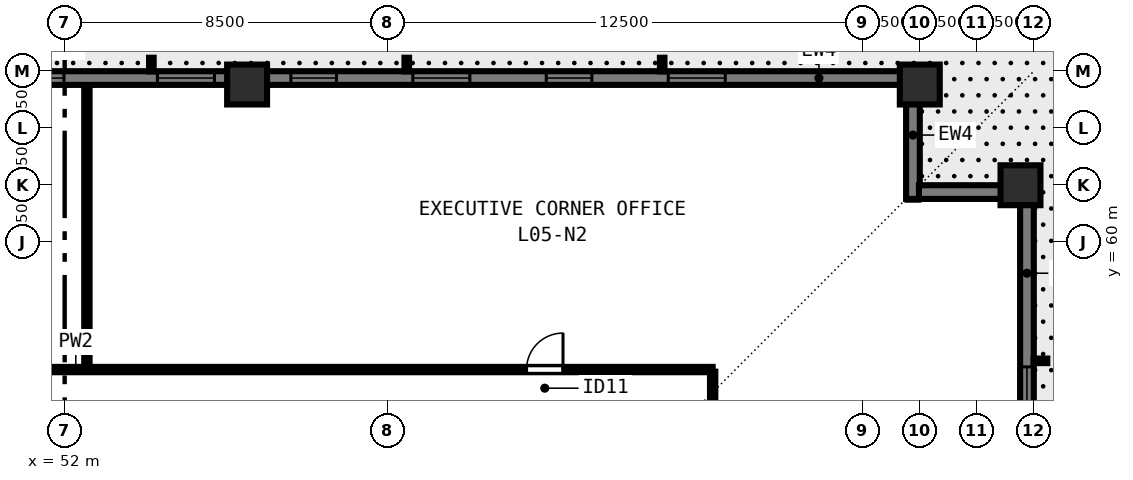
"""IFC4 building model, lengths in metres.
Left out: names, types, materials, properties, quantities, classifications, styles, units other than length and angle.
Written with IfcOpenShell. Run it as: python <this file> out.ifc"""

import sys

from ifc_helpers import new_model, si_unit, direction, frame, frame_2d, origin, origin_2d, place, context, subcontext, project, spatial, rectangle, extrude, element, fill, save


model = new_model("IFC4")
c1 = context("Model", 3, precision=1e-05, world=origin(), true_north=direction((0.0, 1.0)))
c2 = subcontext(c1, "Body", "Model", "MODEL_VIEW")
j1 = project(units=[si_unit("LENGTHUNIT", "METRE"), si_unit("PLANEANGLEUNIT", "RADIAN")], contexts=[c1])
p1 = place(None, origin())
s1 = spatial("IfcSite", under=j1, at=p1, CompositionType="ELEMENT")
p2 = place(p1, origin())
s2 = spatial("IfcBuilding", under=s1, at=p2, CompositionType="ELEMENT")
p3 = place(p2, frame((0.0, 0.0, 23.5)))
s3 = spatial("IfcBuildingStorey", under=s2, at=p3, CompositionType="ELEMENT", Elevation=23.5)
for number, where, z_axis, x_axis in (
    (1, (77.15, 61.5, 0.0), (0.0, 0.0, 1.0), (0.0, 1.0, 0.0)),
    (2, (74.5, 64.15, 0.0), (0.0, 0.0, 1.0), (1.0, 0.0, 0.0)),
    (3, (56.8, 64.15, 0.0), (0.0, 0.0, 1.0), (1.0, 0.0, 0.0)),
):
    element("IfcColumn", number, at=place(p3, frame(where, z_axis=z_axis, x_axis=x_axis)), inside=s3, PredefinedType="COLUMN", context=c2, shape_type="SweptSolid", body=[
        extrude(rectangle(XDim=1.05, YDim=1.05, at=origin_2d()), origin(), (0.0, 0.0, 1.0), 3.5),
    ])
p4 = place(p3, frame((29.5, 64.32, 0.0), z_axis=(0.0, 0.0, 1.0), x_axis=(1.0, 0.0, 0.0)))
e4 = element("IfcWall", 4, at=p4, inside=s3, PredefinedType="SOLIDWALL", context=c2, shape_type="SweptSolid", body=[
    extrude(rectangle(XDim=44.662, YDim=0.36, at=frame_2d((22.331, 0.0))), origin(), (0.0, 0.0, 1.0), 3.28),
])
p5 = place(p4, frame((4.78, 0.0, 0.8)))
e5 = element("IfcOpeningElement", 5, at=p5, cuts=e4, PredefinedType="OPENING", context=c2, shape_type="SweptSolid", body=[
    extrude(rectangle(XDim=1.5, YDim=1.544, at=frame_2d((0.75, 0.772))), frame((0.0, 0.19, 0.0), z_axis=(0.0, -1.0, 0.0), x_axis=(1.0, 0.0, 0.0)), (0.0, 0.0, 1.0), 0.38),
])
p6 = place(p4, frame((8.29, 0.0, 0.8)))
e6 = element("IfcOpeningElement", 6, at=p6, cuts=e4, PredefinedType="OPENING", context=c2, shape_type="SweptSolid", body=[
    extrude(rectangle(XDim=1.2, YDim=1.544, at=frame_2d((0.6, 0.772))), frame((0.0, 0.19, 0.0), z_axis=(0.0, -1.0, 0.0), x_axis=(1.0, 0.0, 0.0)), (0.0, 0.0, 1.0), 0.38),
])
p7 = place(p4, frame((11.5, 0.0, 0.8)))
e7 = element("IfcOpeningElement", 7, at=p7, cuts=e4, PredefinedType="OPENING", context=c2, shape_type="SweptSolid", body=[
    extrude(rectangle(XDim=1.5, YDim=1.544, at=frame_2d((0.75, 0.772))), frame((0.0, 0.19, 0.0), z_axis=(0.0, -1.0, 0.0), x_axis=(1.0, 0.0, 0.0)), (0.0, 0.0, 1.0), 0.38),
])
p8 = place(p4, frame((15.01, 0.0, 0.8)))
e8 = element("IfcOpeningElement", 8, at=p8, cuts=e4, PredefinedType="OPENING", context=c2, shape_type="SweptSolid", body=[
    extrude(rectangle(XDim=1.2, YDim=1.544, at=frame_2d((0.6, 0.772))), frame((0.0, 0.19, 0.0), z_axis=(0.0, -1.0, 0.0), x_axis=(1.0, 0.0, 0.0)), (0.0, 0.0, 1.0), 0.38),
])
p9 = place(p4, frame((18.671, 0.0, 0.8)))
e9 = element("IfcOpeningElement", 9, at=p9, cuts=e4, PredefinedType="OPENING", context=c2, shape_type="SweptSolid", body=[
    extrude(rectangle(XDim=1.5, YDim=1.544, at=frame_2d((0.75, 0.772))), frame((0.0, 0.19, 0.0), z_axis=(0.0, -1.0, 0.0), x_axis=(1.0, 0.0, 0.0)), (0.0, 0.0, 1.0), 0.38),
])
p10 = place(p4, frame((21.281, 0.0, 0.8)))
e10 = element("IfcOpeningElement", 10, at=p10, cuts=e4, PredefinedType="OPENING", context=c2, shape_type="SweptSolid", body=[
    extrude(rectangle(XDim=1.2, YDim=1.544, at=frame_2d((0.6, 0.772))), frame((0.0, 0.19, 0.0), z_axis=(0.0, -1.0, 0.0), x_axis=(1.0, 0.0, 0.0)), (0.0, 0.0, 1.0), 0.38),
])
p11 = place(p4, frame((24.941, 0.0, 0.8)))
e11 = element("IfcOpeningElement", 11, at=p11, cuts=e4, PredefinedType="OPENING", context=c2, shape_type="SweptSolid", body=[
    extrude(rectangle(XDim=1.5, YDim=1.544, at=frame_2d((0.75, 0.772))), frame((0.0, 0.19, 0.0), z_axis=(0.0, -1.0, 0.0), x_axis=(1.0, 0.0, 0.0)), (0.0, 0.0, 1.0), 0.38),
])
p12 = place(p4, frame((28.451, 0.0, 0.8)))
e12 = element("IfcOpeningElement", 12, at=p12, cuts=e4, PredefinedType="OPENING", context=c2, shape_type="SweptSolid", body=[
    extrude(rectangle(XDim=1.2, YDim=1.544, at=frame_2d((0.6, 0.772))), frame((0.0, 0.19, 0.0), z_axis=(0.0, -1.0, 0.0), x_axis=(1.0, 0.0, 0.0)), (0.0, 0.0, 1.0), 0.38),
])
p13 = place(p4, frame((31.662, 0.0, 0.8)))
e13 = element("IfcOpeningElement", 13, at=p13, cuts=e4, PredefinedType="OPENING", context=c2, shape_type="SweptSolid", body=[
    extrude(rectangle(XDim=1.5, YDim=1.544, at=frame_2d((0.75, 0.772))), frame((0.0, 0.19, 0.0), z_axis=(0.0, -1.0, 0.0), x_axis=(1.0, 0.0, 0.0)), (0.0, 0.0, 1.0), 0.38),
])
p14 = place(p4, frame((35.172, 0.0, 0.8)))
e14 = element("IfcOpeningElement", 14, at=p14, cuts=e4, PredefinedType="OPENING", context=c2, shape_type="SweptSolid", body=[
    extrude(rectangle(XDim=1.2, YDim=1.544, at=frame_2d((0.6, 0.772))), frame((0.0, 0.19, 0.0), z_axis=(0.0, -1.0, 0.0), x_axis=(1.0, 0.0, 0.0)), (0.0, 0.0, 1.0), 0.38),
])
p15 = place(p4, frame((38.382, 0.0, 0.8)))
e15 = element("IfcOpeningElement", 15, at=p15, cuts=e4, PredefinedType="OPENING", context=c2, shape_type="SweptSolid", body=[
    extrude(rectangle(XDim=1.5, YDim=1.544, at=frame_2d((0.75, 0.772))), frame((0.0, 0.19, 0.0), z_axis=(0.0, -1.0, 0.0), x_axis=(1.0, 0.0, 0.0)), (0.0, 0.0, 1.0), 0.38),
])
p16 = place(p3, frame((74.32, 64.5, 0.0), z_axis=(0.0, 0.0, 1.0), x_axis=(0.0, -1.0, 0.0)))
e16 = element("IfcWall", 16, at=p16, inside=s3, PredefinedType="SOLIDWALL", context=c2, shape_type="SweptSolid", body=[
    extrude(rectangle(XDim=3.36, YDim=0.36, at=frame_2d((1.68, 0.0))), origin(), (0.0, 0.0, 1.0), 3.28),
])
p17 = place(p3, frame((74.478, 61.32, 0.0), z_axis=(0.0, 0.0, 1.0), x_axis=(1.0, 0.0, 0.0)))
e17 = element("IfcWall", 17, at=p17, inside=s3, PredefinedType="SOLIDWALL", context=c2, shape_type="SweptSolid", body=[
    extrude(rectangle(XDim=2.684, YDim=0.36, at=frame_2d((1.342, 0.0))), origin(), (0.0, 0.0, 1.0), 3.28),
])
p18 = place(p3, frame((77.32, 61.5, 0.0), z_axis=(0.0, 0.0, 1.0), x_axis=(0.0, -1.0, 0.0)))
e18 = element("IfcWall", 18, at=p18, inside=s3, PredefinedType="SOLIDWALL", context=c2, shape_type="SweptSolid", body=[
    extrude(rectangle(XDim=44.662, YDim=0.36, at=frame_2d((22.331, 0.0))), origin(), (0.0, 0.0, 1.0), 3.28),
])
p19 = place(p18, frame((4.78, 0.0, 0.8)))
e19 = element("IfcOpeningElement", 19, at=p19, cuts=e18, PredefinedType="OPENING", context=c2, shape_type="SweptSolid", body=[
    extrude(rectangle(XDim=1.5, YDim=1.544, at=frame_2d((0.75, 0.772))), frame((0.0, 0.19, 0.0), z_axis=(0.0, -1.0, 0.0), x_axis=(1.0, 0.0, 0.0)), (0.0, 0.0, 1.0), 0.38),
])
p20 = place(p18, frame((8.29, 0.0, 0.8)))
e20 = element("IfcOpeningElement", 20, at=p20, cuts=e18, PredefinedType="OPENING", context=c2, shape_type="SweptSolid", body=[
    extrude(rectangle(XDim=1.2, YDim=1.544, at=frame_2d((0.6, 0.772))), frame((0.0, 0.19, 0.0), z_axis=(0.0, -1.0, 0.0), x_axis=(1.0, 0.0, 0.0)), (0.0, 0.0, 1.0), 0.38),
])
p21 = place(p18, frame((11.5, 0.0, 0.8)))
e21 = element("IfcOpeningElement", 21, at=p21, cuts=e18, PredefinedType="OPENING", context=c2, shape_type="SweptSolid", body=[
    extrude(rectangle(XDim=1.5, YDim=1.544, at=frame_2d((0.75, 0.772))), frame((0.0, 0.19, 0.0), z_axis=(0.0, -1.0, 0.0), x_axis=(1.0, 0.0, 0.0)), (0.0, 0.0, 1.0), 0.38),
])
p22 = place(p18, frame((15.01, 0.0, 0.8)))
e22 = element("IfcOpeningElement", 22, at=p22, cuts=e18, PredefinedType="OPENING", context=c2, shape_type="SweptSolid", body=[
    extrude(rectangle(XDim=1.2, YDim=1.544, at=frame_2d((0.6, 0.772))), frame((0.0, 0.19, 0.0), z_axis=(0.0, -1.0, 0.0), x_axis=(1.0, 0.0, 0.0)), (0.0, 0.0, 1.0), 0.38),
])
p23 = place(p18, frame((18.671, 0.0, 0.8)))
e23 = element("IfcOpeningElement", 23, at=p23, cuts=e18, PredefinedType="OPENING", context=c2, shape_type="SweptSolid", body=[
    extrude(rectangle(XDim=1.5, YDim=1.544, at=frame_2d((0.75, 0.772))), frame((0.0, 0.19, 0.0), z_axis=(0.0, -1.0, 0.0), x_axis=(1.0, 0.0, 0.0)), (0.0, 0.0, 1.0), 0.38),
])
p24 = place(p18, frame((22.581, 0.0, 0.8)))
e24 = element("IfcOpeningElement", 24, at=p24, cuts=e18, PredefinedType="OPENING", context=c2, shape_type="SweptSolid", body=[
    extrude(rectangle(XDim=1.2, YDim=1.544, at=frame_2d((0.6, 0.772))), frame((0.0, 0.19, 0.0), z_axis=(0.0, -1.0, 0.0), x_axis=(1.0, 0.0, 0.0)), (0.0, 0.0, 1.0), 0.38),
])
p25 = place(p18, frame((24.941, 0.0, 0.8)))
e25 = element("IfcOpeningElement", 25, at=p25, cuts=e18, PredefinedType="OPENING", context=c2, shape_type="SweptSolid", body=[
    extrude(rectangle(XDim=1.5, YDim=1.544, at=frame_2d((0.75, 0.772))), frame((0.0, 0.19, 0.0), z_axis=(0.0, -1.0, 0.0), x_axis=(1.0, 0.0, 0.0)), (0.0, 0.0, 1.0), 0.38),
])
p26 = place(p18, frame((28.451, 0.0, 0.8)))
e26 = element("IfcOpeningElement", 26, at=p26, cuts=e18, PredefinedType="OPENING", context=c2, shape_type="SweptSolid", body=[
    extrude(rectangle(XDim=1.2, YDim=1.544, at=frame_2d((0.6, 0.772))), frame((0.0, 0.19, 0.0), z_axis=(0.0, -1.0, 0.0), x_axis=(1.0, 0.0, 0.0)), (0.0, 0.0, 1.0), 0.38),
])
p27 = place(p18, frame((31.662, 0.0, 0.8)))
e27 = element("IfcOpeningElement", 27, at=p27, cuts=e18, PredefinedType="OPENING", context=c2, shape_type="SweptSolid", body=[
    extrude(rectangle(XDim=1.5, YDim=1.544, at=frame_2d((0.75, 0.772))), frame((0.0, 0.19, 0.0), z_axis=(0.0, -1.0, 0.0), x_axis=(1.0, 0.0, 0.0)), (0.0, 0.0, 1.0), 0.38),
])
p28 = place(p18, frame((35.172, 0.0, 0.8)))
e28 = element("IfcOpeningElement", 28, at=p28, cuts=e18, PredefinedType="OPENING", context=c2, shape_type="SweptSolid", body=[
    extrude(rectangle(XDim=1.2, YDim=1.544, at=frame_2d((0.6, 0.772))), frame((0.0, 0.19, 0.0), z_axis=(0.0, -1.0, 0.0), x_axis=(1.0, 0.0, 0.0)), (0.0, 0.0, 1.0), 0.38),
])
p29 = place(p18, frame((38.382, 0.0, 0.8)))
e29 = element("IfcOpeningElement", 29, at=p29, cuts=e18, PredefinedType="OPENING", context=c2, shape_type="SweptSolid", body=[
    extrude(rectangle(XDim=1.5, YDim=1.544, at=frame_2d((0.75, 0.772))), frame((0.0, 0.19, 0.0), z_axis=(0.0, -1.0, 0.0), x_axis=(1.0, 0.0, 0.0)), (0.0, 0.0, 1.0), 0.38),
])
p30 = place(p3, frame((34.95, 56.65, 0.0), z_axis=(0.0, 0.0, 1.0), x_axis=(1.0, 0.0, 0.0)))
e30 = element("IfcWall", 30, at=p30, inside=s3, PredefinedType="PARTITIONING", context=c2, shape_type="SweptSolid", body=[
    extrude(rectangle(XDim=34.1, YDim=0.14, at=frame_2d((17.05, 0.0))), origin(), (0.0, 0.0, 1.0), 3.28),
])
p31 = place(p30, frame((4.522, 0.0, 0.0)))
e31 = element("IfcOpeningElement", 31, at=p31, cuts=e30, PredefinedType="OPENING", context=c2, shape_type="SweptSolid", body=[
    extrude(rectangle(XDim=0.96, YDim=2.12, at=frame_2d((0.48, 1.06))), frame((0.0, 0.08, 0.0), z_axis=(0.0, -1.0, 0.0), x_axis=(1.0, 0.0, 0.0)), (0.0, 0.0, 1.0), 0.16),
])
p32 = place(p30, frame((29.202, 0.0, 0.0)))
e32 = element("IfcOpeningElement", 32, at=p32, cuts=e30, PredefinedType="OPENING", context=c2, shape_type="SweptSolid", body=[
    extrude(rectangle(XDim=0.96, YDim=2.12, at=frame_2d((0.48, 1.06))), frame((0.0, 0.08, 0.0), z_axis=(0.0, -1.0, 0.0), x_axis=(1.0, 0.0, 0.0)), (0.0, 0.0, 1.0), 0.16),
])
p33 = place(p3, frame((69.05, 21.405, 0.0), z_axis=(0.0, 0.0, 1.0), x_axis=(0.0, 1.0, 0.0)))
e33 = element("IfcWall", 33, at=p33, inside=s3, PredefinedType="PARTITIONING", context=c2, shape_type="SweptSolid", body=[
    extrude(rectangle(XDim=35.19, YDim=0.14, at=frame_2d((17.595, 0.0))), origin(), (0.0, 0.0, 1.0), 3.28),
])
p34 = place(p33, frame((8.545, 0.0, 0.0)))
e34 = element("IfcOpeningElement", 34, at=p34, cuts=e33, PredefinedType="OPENING", context=c2, shape_type="SweptSolid", body=[
    extrude(rectangle(XDim=0.96, YDim=2.12, at=frame_2d((0.48, 1.06))), frame((0.0, 0.08, 0.0), z_axis=(0.0, -1.0, 0.0), x_axis=(1.0, 0.0, 0.0)), (0.0, 0.0, 1.0), 0.16),
])
p35 = place(p33, frame((26.095, 0.0, 0.0)))
e35 = element("IfcOpeningElement", 35, at=p35, cuts=e33, PredefinedType="OPENING", context=c2, shape_type="SweptSolid", body=[
    extrude(rectangle(XDim=0.96, YDim=2.12, at=frame_2d((0.48, 1.06))), frame((0.0, 0.08, 0.0), z_axis=(0.0, -1.0, 0.0), x_axis=(1.0, 0.0, 0.0)), (0.0, 0.0, 1.0), 0.16),
])
p36 = place(p3, frame((52.585, 56.75, 0.0), z_axis=(0.0, 0.0, 1.0), x_axis=(0.0, 1.0, 0.0)))
e36 = element("IfcWall", 36, at=p36, inside=s3, PredefinedType="PARTITIONING", context=c2, shape_type="SweptSolid", body=[
    extrude(rectangle(XDim=7.33, YDim=0.14, at=frame_2d((3.665, 0.0))), origin(), (0.0, 0.0, 1.0), 2.849),
])
p37 = place(p10, origin())
e37 = element("IfcWindow", 37, at=p37, inside=s3, PartitioningType="SINGLE_PANEL", PredefinedType="WINDOW", context=c2, shape_type="SweptSolid", body=[
    extrude(rectangle(XDim=1.2, YDim=1.544, at=frame_2d((0.6, 0.772))), frame((0.0, -0.05, 0.0), z_axis=(0.0, -1.0, 0.0), x_axis=(1.0, 0.0, 0.0)), (0.0, 0.0, 1.0), 0.06),
])
fill(e10, e37)
p38 = place(p11, origin())
e38 = element("IfcWindow", 38, at=p38, inside=s3, PartitioningType="SINGLE_PANEL", PredefinedType="WINDOW", context=c2, shape_type="SweptSolid", body=[
    extrude(rectangle(XDim=1.5, YDim=1.544, at=frame_2d((0.75, 0.772))), frame((0.0, -0.05, 0.0), z_axis=(0.0, -1.0, 0.0), x_axis=(1.0, 0.0, 0.0)), (0.0, 0.0, 1.0), 0.06),
])
fill(e11, e38)
p39 = place(p12, origin())
e39 = element("IfcWindow", 39, at=p39, inside=s3, PartitioningType="SINGLE_PANEL", PredefinedType="WINDOW", context=c2, shape_type="SweptSolid", body=[
    extrude(rectangle(XDim=1.2, YDim=1.544, at=frame_2d((0.6, 0.772))), frame((0.0, -0.05, 0.0), z_axis=(0.0, -1.0, 0.0), x_axis=(1.0, 0.0, 0.0)), (0.0, 0.0, 1.0), 0.06),
])
fill(e12, e39)
p40 = place(p13, origin())
e40 = element("IfcWindow", 40, at=p40, inside=s3, PartitioningType="SINGLE_PANEL", PredefinedType="WINDOW", context=c2, shape_type="SweptSolid", body=[
    extrude(rectangle(XDim=1.5, YDim=1.544, at=frame_2d((0.75, 0.772))), frame((0.0, -0.05, 0.0), z_axis=(0.0, -1.0, 0.0), x_axis=(1.0, 0.0, 0.0)), (0.0, 0.0, 1.0), 0.06),
])
fill(e13, e40)
p41 = place(p14, origin())
e41 = element("IfcWindow", 41, at=p41, inside=s3, PartitioningType="SINGLE_PANEL", PredefinedType="WINDOW", context=c2, shape_type="SweptSolid", body=[
    extrude(rectangle(XDim=1.2, YDim=1.544, at=frame_2d((0.6, 0.772))), frame((0.0, -0.05, 0.0), z_axis=(0.0, -1.0, 0.0), x_axis=(1.0, 0.0, 0.0)), (0.0, 0.0, 1.0), 0.06),
])
fill(e14, e41)
p42 = place(p15, origin())
e42 = element("IfcWindow", 42, at=p42, inside=s3, PartitioningType="SINGLE_PANEL", PredefinedType="WINDOW", context=c2, shape_type="SweptSolid", body=[
    extrude(rectangle(XDim=1.5, YDim=1.544, at=frame_2d((0.75, 0.772))), frame((0.0, -0.05, 0.0), z_axis=(0.0, -1.0, 0.0), x_axis=(1.0, 0.0, 0.0)), (0.0, 0.0, 1.0), 0.06),
])
fill(e15, e42)
p43 = place(p19, origin())
e43 = element("IfcWindow", 43, at=p43, inside=s3, PartitioningType="SINGLE_PANEL", PredefinedType="WINDOW", context=c2, shape_type="SweptSolid", body=[
    extrude(rectangle(XDim=1.5, YDim=1.544, at=frame_2d((0.75, 0.772))), frame((0.0, -0.05, 0.0), z_axis=(0.0, -1.0, 0.0), x_axis=(1.0, 0.0, 0.0)), (0.0, 0.0, 1.0), 0.06),
])
fill(e19, e43)
p44 = place(p32, origin())
e44 = element("IfcDoor", 44, at=p44, inside=s3, OperationType="SINGLE_SWING_RIGHT", PredefinedType="DOOR", context=c2, shape_type="SweptSolid", body=[
    extrude(rectangle(XDim=0.96, YDim=2.12, at=frame_2d((0.48, 1.06))), frame((0.0, 0.025, 0.0), z_axis=(0.0, -1.0, 0.0), x_axis=(1.0, 0.0, 0.0)), (0.0, 0.0, 1.0), 0.05),
])
fill(e32, e44)
save(model, sys.argv[1])
